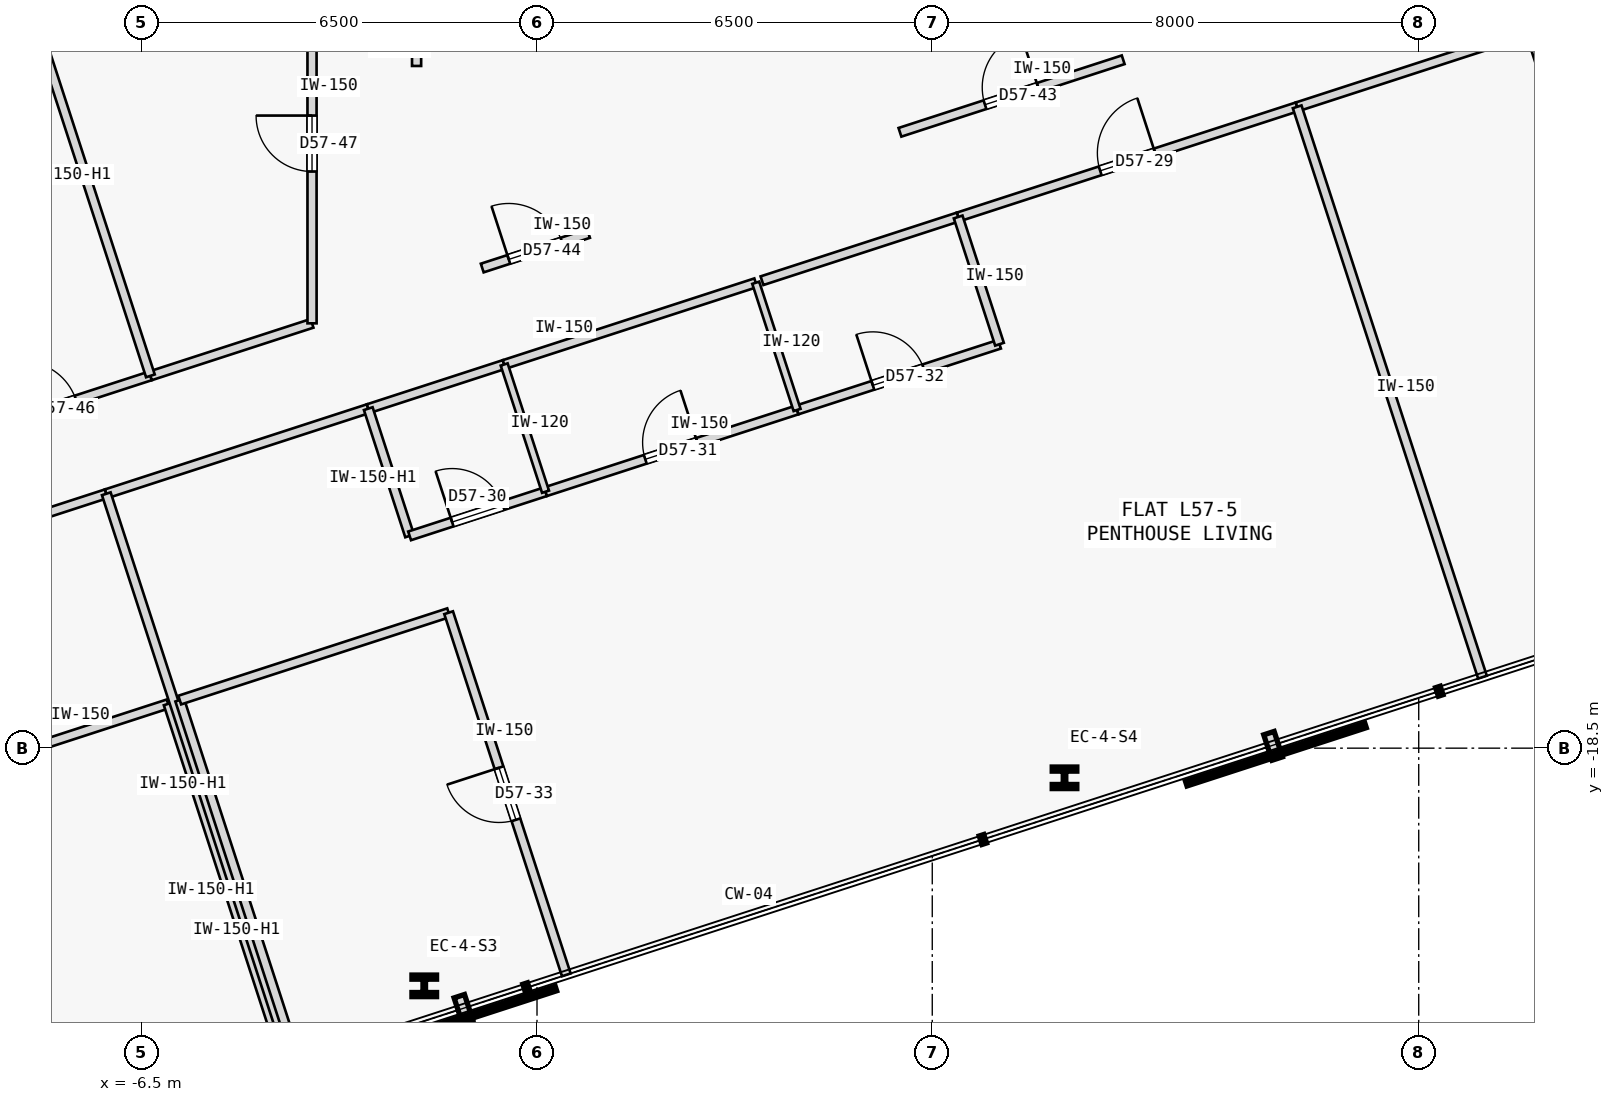
"""IFC4 building model, lengths in metres.
Left out: names, types, materials, properties, quantities, classifications, styles, units other than length and angle.
Written with IfcOpenShell. Run it as: python <this file> out.ifc"""

import sys

from ifc_helpers import new_model, si_unit, direction, frame, frame_2d, origin, origin_2d, place, context, subcontext, project, spatial, rectangle, i_section, extrude, element, fill, save


model = new_model("IFC4")
c1 = context("Model", 3, precision=1e-05, world=origin(), true_north=direction((0.0, 1.0)))
c2 = subcontext(c1, "Body", "Model", "MODEL_VIEW")
j1 = project(units=[si_unit("LENGTHUNIT", "METRE"), si_unit("PLANEANGLEUNIT", "RADIAN")], contexts=[c1])
p1 = place(None, origin())
s1 = spatial("IfcSite", under=j1, at=p1, CompositionType="ELEMENT")
p2 = place(p1, origin())
s2 = spatial("IfcBuilding", under=s1, at=p2, CompositionType="ELEMENT")
p3 = place(p2, frame((0.0, 0.0, 217.6)))
s3 = spatial("IfcBuildingStorey", under=s2, at=p3, CompositionType="ELEMENT", Elevation=217.6)
for number, where, z_axis, x_axis in (
    (1, (-1.854, -22.409, 0.0), (0.0, 0.0, 1.0), (1.0, 0.0, 0.0)),
    (2, (8.675, -18.988, 0.0), (0.0, 0.0, 1.0), (1.0, 0.0, 0.0)),
):
    element("IfcColumn", number, at=place(p3, frame(where, z_axis=z_axis, x_axis=x_axis)), inside=s3, PredefinedType="COLUMN", context=c2, shape_type="SweptSolid", body=[
        extrude(i_section(OverallWidth=0.405, OverallDepth=0.355, WebThickness=0.042, FlangeThickness=0.068, FilletRadius=0.015, at=origin_2d()), origin(), (0.0, 0.0, 1.0), 3.35),
    ])
p4 = place(p3, frame((-14.349, -16.677, 0.0), z_axis=(0.0, 0.0, 1.0), x_axis=(0.951058958043, 0.309009479345, 0.0)))
e3 = element("IfcWall", 3, at=p4, inside=s3, PredefinedType="PARTITIONING", context=c2, shape_type="SweptSolid", body=[
    extrude(rectangle(XDim=7.64, YDim=0.15, at=frame_2d((3.82, 0.0))), origin(), (0.0, 0.0, 1.0), 3.125),
])
p5 = place(p4, frame((3.345, 0.0, 0.0)))
e4 = element("IfcOpeningElement", 4, at=p5, cuts=e3, PredefinedType="OPENING", context=c2, shape_type="SweptSolid", body=[
    extrude(rectangle(XDim=0.95, YDim=2.15, at=frame_2d((0.475, 1.075))), frame((0.0, 0.085, 0.0), z_axis=(0.0, -1.0, 0.0), x_axis=(1.0, 0.0, 0.0)), (0.0, 0.0, 1.0), 0.17),
])
p6 = place(p3, frame((-7.083, -14.316, 0.0), z_axis=(0.0, 0.0, 1.0), x_axis=(0.951054265246, 0.309023922305, 0.0)))
e5 = element("IfcWall", 5, at=p6, inside=s3, PredefinedType="PARTITIONING", context=c2, shape_type="SweptSolid", body=[
    extrude(rectangle(XDim=4.53, YDim=0.15, at=frame_2d((2.265, 0.0))), origin(), (0.0, 0.0, 1.0), 3.125),
])
p7 = place(p3, frame((6.926, -9.765, 0.0), z_axis=(0.0, 0.0, 1.0), x_axis=(0.951054878391, 0.30902203528, 0.0)))
e6 = element("IfcWall", 6, at=p7, inside=s3, PredefinedType="PARTITIONING", context=c2, shape_type="SweptSolid", body=[
    extrude(rectangle(XDim=5.862, YDim=0.15, at=frame_2d((2.931, 0.0))), origin(), (0.0, 0.0, 1.0), 3.125),
])
p8 = place(p7, frame((2.456, 0.0, 0.0)))
e7 = element("IfcOpeningElement", 7, at=p8, cuts=e6, PredefinedType="OPENING", context=c2, shape_type="SweptSolid", body=[
    extrude(rectangle(XDim=0.95, YDim=2.15, at=frame_2d((0.475, 1.075))), frame((0.0, 0.085, 0.0), z_axis=(0.0, -1.0, 0.0), x_axis=(1.0, 0.0, 0.0)), (0.0, 0.0, 1.0), 0.17),
])
p9 = place(p3, frame((-2.775, -12.917, 0.0), z_axis=(0.0, 0.0, 1.0), x_axis=(0.951066131077, 0.308987401554, 0.0)))
e8 = element("IfcWall", 8, at=p9, inside=s3, PredefinedType="PARTITIONING", context=c2, shape_type="SweptSolid", body=[
    extrude(rectangle(XDim=2.35, YDim=0.15, at=frame_2d((1.175, 0.0))), origin(), (0.0, 0.0, 1.0), 3.125),
])
p10 = place(p3, frame((-0.54, -12.19, 0.0), z_axis=(0.0, 0.0, 1.0), x_axis=(0.951057987102, 0.309012467661, 0.0)))
e9 = element("IfcWall", 9, at=p10, inside=s3, PredefinedType="PARTITIONING", context=c2, shape_type="SweptSolid", body=[
    extrude(rectangle(XDim=4.35, YDim=0.15, at=frame_2d((2.175, 0.0))), origin(), (0.0, 0.0, 1.0), 3.125),
])
p11 = place(p3, frame((3.7, -10.813, 0.0), z_axis=(0.0, 0.0, 1.0), x_axis=(0.95106685659, 0.308985168408, 0.0)))
e10 = element("IfcWall", 10, at=p11, inside=s3, PredefinedType="PARTITIONING", context=c2, shape_type="SweptSolid", body=[
    extrude(rectangle(XDim=3.392, YDim=0.15, at=frame_2d((1.696, 0.0))), origin(), (0.0, 0.0, 1.0), 3.125),
])
p12 = place(p3, frame((12.501, -7.953, 0.0), z_axis=(0.0, 0.0, 1.0), x_axis=(0.951046103464, 0.309049039936, 0.0)))
e11 = element("IfcWall", 11, at=p12, inside=s3, PredefinedType="PARTITIONING", context=c2, shape_type="SweptSolid", body=[
    extrude(rectangle(XDim=4.025, YDim=0.15, at=frame_2d((2.012, 0.0))), origin(), (0.0, 0.0, 1.0), 3.125),
])
p13 = place(p3, frame((5.969, -8.372, 0.0), z_axis=(0.0, 0.0, 1.0), x_axis=(0.951053123415, 0.309027436391, 0.0)))
e12 = element("IfcWall", 12, at=p13, inside=s3, PredefinedType="PARTITIONING", context=c2, shape_type="SweptSolid", body=[
    extrude(rectangle(XDim=3.86, YDim=0.15, at=frame_2d((1.93, 0.0))), origin(), (0.0, 0.0, 1.0), 3.125),
])
p14 = place(p13, frame((1.47, 0.0, 0.0)))
e13 = element("IfcOpeningElement", 13, at=p14, cuts=e12, PredefinedType="OPENING", context=c2, shape_type="SweptSolid", body=[
    extrude(rectangle(XDim=0.92, YDim=2.15, at=frame_2d((0.46, 1.075))), frame((0.0, 0.085, 0.0), z_axis=(0.0, -1.0, 0.0), x_axis=(1.0, 0.0, 0.0)), (0.0, 0.0, 1.0), 0.17),
])
p15 = place(p3, frame((-0.901, -10.604, 0.0), z_axis=(0.0, 0.0, 1.0), x_axis=(0.951085784807, 0.308926900637, 0.0)))
e14 = element("IfcWall", 14, at=p15, inside=s3, PredefinedType="PARTITIONING", context=c2, shape_type="SweptSolid", body=[
    extrude(rectangle(XDim=1.838, YDim=0.15, at=frame_2d((0.919, 0.0))), origin(), (0.0, 0.0, 1.0), 3.125),
])
p16 = place(p15, frame((0.459, 0.0, 0.0)))
e15 = element("IfcOpeningElement", 15, at=p16, cuts=e14, PredefinedType="OPENING", context=c2, shape_type="SweptSolid", body=[
    extrude(rectangle(XDim=0.92, YDim=2.15, at=frame_2d((0.46, 1.075))), frame((0.0, 0.085, 0.0), z_axis=(0.0, -1.0, 0.0), x_axis=(1.0, 0.0, 0.0)), (0.0, 0.0, 1.0), 0.17),
])
p17 = place(p3, frame((-1.98, -7.281, 0.0), z_axis=(0.0, 0.0, 1.0), x_axis=(0.000784313484, 0.999999692426, 0.0)))
e16 = element("IfcWall", 16, at=p17, inside=s3, PredefinedType="PARTITIONING", context=c2, shape_type="SweptSolid", body=[
    extrude(rectangle(XDim=0.623, YDim=0.15, at=frame_2d((0.311, 0.0))), origin(), (0.0, 0.0, 1.0), 3.125),
])
p18 = place(p3, frame((-9.679, -13.457, 0.0), z_axis=(0.0, 0.0, 1.0), x_axis=(0.951054104561, 0.309024416831, 0.0)))
e17 = element("IfcWall", 17, at=p18, inside=s3, PredefinedType="PARTITIONING", context=c2, shape_type="SweptSolid", body=[
    extrude(rectangle(XDim=3.492, YDim=0.15, at=frame_2d((1.746, 0.0))), origin(), (0.0, 0.0, 1.0), 3.125),
])
p19 = place(p18, frame((1.286, 0.0, 0.0)))
e18 = element("IfcOpeningElement", 18, at=p19, cuts=e17, PredefinedType="OPENING", context=c2, shape_type="SweptSolid", body=[
    extrude(rectangle(XDim=0.92, YDim=2.15, at=frame_2d((0.46, 1.075))), frame((0.0, 0.085, 0.0), z_axis=(0.0, -1.0, 0.0), x_axis=(1.0, 0.0, 0.0)), (0.0, 0.0, 1.0), 0.17),
])
p20 = place(p3, frame((-6.358, -12.377, 0.0), z_axis=(0.0, 0.0, 1.0), x_axis=(0.951049473261, 0.309038669765, 0.0)))
e19 = element("IfcWall", 19, at=p20, inside=s3, PredefinedType="PARTITIONING", context=c2, shape_type="SweptSolid", body=[
    extrude(rectangle(XDim=2.795, YDim=0.15, at=frame_2d((1.397, 0.0))), origin(), (0.0, 0.0, 1.0), 3.125),
])
p21 = place(p3, frame((-3.7, -11.514, 0.0), z_axis=(0.0, 0.0, 1.0), x_axis=(-8.2572974e-05, 0.999999996591, 0.0)))
e20 = element("IfcWall", 20, at=p21, inside=s3, PredefinedType="PARTITIONING", context=c2, shape_type="SweptSolid", body=[
    extrude(rectangle(XDim=5.913, YDim=0.15, at=frame_2d((2.957, 0.0))), origin(), (0.0, 0.0, 1.0), 3.125),
])
p22 = place(p21, frame((2.497, 0.0, 0.0)))
e21 = element("IfcOpeningElement", 21, at=p22, cuts=e20, PredefinedType="OPENING", context=c2, shape_type="SweptSolid", body=[
    extrude(rectangle(XDim=0.92, YDim=2.15, at=frame_2d((0.46, 1.075))), frame((0.0, 0.085, 0.0), z_axis=(0.0, -1.0, 0.0), x_axis=(1.0, 0.0, 0.0)), (0.0, 0.0, 1.0), 0.17),
])
p23 = place(p3, frame((-10.488, -19.208, 0.0), z_axis=(0.0, 0.0, 1.0), x_axis=(0.951050272606, 0.309036209813, 0.0)))
e22 = element("IfcWall", 22, at=p23, inside=s3, PredefinedType="PARTITIONING", context=c2, shape_type="SweptSolid", body=[
    extrude(rectangle(XDim=4.65, YDim=0.15, at=frame_2d((2.325, 0.0))), origin(), (0.0, 0.0, 1.0), 3.125),
])
p24 = place(p3, frame((-4.131, -23.727, 0.0), z_axis=(0.0, 0.0, 1.0), x_axis=(-0.309013782848, 0.951057559777, 0.0)))
e23 = element("IfcWall", 23, at=p24, inside=s3, PredefinedType="PARTITIONING", context=c2, shape_type="SweptSolid", body=[
    extrude(rectangle(XDim=6.262, YDim=0.15, at=frame_2d((3.131, 0.0))), origin(), (0.0, 0.0, 1.0), 2.675),
])
p25 = place(p3, frame((-4.036, -23.696, 0.0), z_axis=(0.0, 0.0, 1.0), x_axis=(-0.309022258842, 0.95105480575, 0.0)))
e24 = element("IfcWall", 24, at=p25, inside=s3, PredefinedType="PARTITIONING", context=c2, shape_type="SweptSolid", body=[
    extrude(rectangle(XDim=9.862, YDim=0.15, at=frame_2d((4.931, 0.0))), origin(), (0.0, 0.0, 1.0), 2.675),
])
p26 = place(p3, frame((-2.095, -15.009, 0.0), z_axis=(0.0, 0.0, 1.0), x_axis=(-0.308960600764, 0.951074837842, 0.0)))
e25 = element("IfcWall", 25, at=p26, inside=s3, PredefinedType="PARTITIONING", context=c2, shape_type="SweptSolid", body=[
    extrude(rectangle(XDim=2.2, YDim=0.15, at=frame_2d((1.1, 0.0))), origin(), (0.0, 0.0, 1.0), 2.675),
])
p27 = place(p3, frame((-2.095, -15.009, 0.0), z_axis=(0.0, 0.0, 1.0), x_axis=(0.951076048914, 0.308956872689, 0.0)))
e26 = element("IfcWall", 26, at=p27, inside=s3, PredefinedType="PARTITIONING", context=c2, shape_type="SweptSolid", body=[
    extrude(rectangle(XDim=2.35, YDim=0.15, at=frame_2d((1.175, 0.0))), origin(), (0.0, 0.0, 1.0), 3.125),
])
p28 = place(p27, frame((0.735, 0.0, 0.0)))
e27 = element("IfcOpeningElement", 27, at=p28, cuts=e26, PredefinedType="OPENING", context=c2, shape_type="SweptSolid", body=[
    extrude(rectangle(XDim=0.88, YDim=2.15, at=frame_2d((0.44, 1.075))), frame((0.0, 0.085, 0.0), z_axis=(0.0, -1.0, 0.0), x_axis=(1.0, 0.0, 0.0)), (0.0, 0.0, 1.0), 0.17),
])
p29 = place(p3, frame((0.14, -14.283, 0.0), z_axis=(0.0, 0.0, 1.0), x_axis=(0.951057987102, 0.309012467661, 0.0)))
e28 = element("IfcWall", 28, at=p29, inside=s3, PredefinedType="PARTITIONING", context=c2, shape_type="SweptSolid", body=[
    extrude(rectangle(XDim=4.35, YDim=0.15, at=frame_2d((2.175, 0.0))), origin(), (0.0, 0.0, 1.0), 3.125),
])
p30 = place(p29, frame((1.725, 0.0, 0.0)))
e29 = element("IfcOpeningElement", 29, at=p30, cuts=e28, PredefinedType="OPENING", context=c2, shape_type="SweptSolid", body=[
    extrude(rectangle(XDim=0.9, YDim=2.15, at=frame_2d((0.45, 1.075))), frame((0.0, 0.085, 0.0), z_axis=(0.0, -1.0, 0.0), x_axis=(1.0, 0.0, 0.0)), (0.0, 0.0, 1.0), 0.17),
])
p31 = place(p3, frame((4.277, -12.938, 0.0), z_axis=(0.0, 0.0, 1.0), x_axis=(0.951055596592, 0.309019824916, 0.0)))
e30 = element("IfcWall", 30, at=p31, inside=s3, PredefinedType="PARTITIONING", context=c2, shape_type="SweptSolid", body=[
    extrude(rectangle(XDim=3.5, YDim=0.15, at=frame_2d((1.75, 0.0))), origin(), (0.0, 0.0, 1.0), 3.125),
])
p32 = place(p31, frame((1.31, 0.0, 0.0)))
e31 = element("IfcOpeningElement", 31, at=p32, cuts=e30, PredefinedType="OPENING", context=c2, shape_type="SweptSolid", body=[
    extrude(rectangle(XDim=0.88, YDim=2.15, at=frame_2d((0.44, 1.075))), frame((0.0, 0.085, 0.0), z_axis=(0.0, -1.0, 0.0), x_axis=(1.0, 0.0, 0.0)), (0.0, 0.0, 1.0), 0.17),
])
p33 = place(p3, frame((7.606, -11.857, 0.0), z_axis=(0.0, 0.0, 1.0), x_axis=(-0.309060979314, 0.951042223598, 0.0)))
e32 = element("IfcWall", 32, at=p33, inside=s3, PredefinedType="PARTITIONING", context=c2, shape_type="SweptSolid", body=[
    extrude(rectangle(XDim=2.2, YDim=0.15, at=frame_2d((1.1, 0.0))), origin(), (0.0, 0.0, 1.0), 3.125),
])
p34 = place(p3, frame((-3.941, -23.665, 0.0), z_axis=(0.0, 0.0, 1.0), x_axis=(-0.309013782848, 0.951057559777, 0.0)))
e33 = element("IfcWall", 33, at=p34, inside=s3, PredefinedType="PARTITIONING", context=c2, shape_type="SweptSolid", body=[
    extrude(rectangle(XDim=6.262, YDim=0.15, at=frame_2d((3.131, 0.0))), origin(), (0.0, 0.0, 1.0), 2.675),
])
p35 = place(p3, frame((-5.876, -17.709, 0.0), z_axis=(0.0, 0.0, 1.0), x_axis=(0.951065702951, 0.308988719326, 0.0)))
e34 = element("IfcWall", 34, at=p35, inside=s3, PredefinedType="PARTITIONING", context=c2, shape_type="SweptSolid", body=[
    extrude(rectangle(XDim=4.65, YDim=0.15, at=frame_2d((2.325, 0.0))), origin(), (0.0, 0.0, 1.0), 3.125),
])
p36 = place(p3, frame((0.482, -22.228, 0.0), z_axis=(0.0, 0.0, 1.0), x_axis=(-0.30902524124, 0.951053836687, 0.0)))
e35 = element("IfcWall", 35, at=p36, inside=s3, PredefinedType="PARTITIONING", context=c2, shape_type="SweptSolid", body=[
    extrude(rectangle(XDim=6.262, YDim=0.15, at=frame_2d((3.131, 0.0))), origin(), (0.0, 0.0, 1.0), 3.125),
])
p37 = place(p36, frame((2.681, 0.0, 0.0)))
e36 = element("IfcOpeningElement", 36, at=p37, cuts=e35, PredefinedType="OPENING", context=c2, shape_type="SweptSolid", body=[
    extrude(rectangle(XDim=0.9, YDim=2.15, at=frame_2d((0.45, 1.075))), frame((0.0, 0.085, 0.0), z_axis=(0.0, -1.0, 0.0), x_axis=(1.0, 0.0, 0.0)), (0.0, 0.0, 1.0), 0.17),
])
p38 = place(p3, frame((15.548, -17.333, 0.0), z_axis=(0.0, 0.0, 1.0), x_axis=(-0.308999867152, 0.951062081097, 0.0)))
e37 = element("IfcWall", 37, at=p38, inside=s3, PredefinedType="PARTITIONING", context=c2, shape_type="SweptSolid", body=[
    extrude(rectangle(XDim=9.862, YDim=0.15, at=frame_2d((4.931, 0.0))), origin(), (0.0, 0.0, 1.0), 3.125),
])
for number, where, z_axis, x_axis in (
    (38, (0.14, -14.283, 0.0), (0.0, 0.0, 1.0), (-0.309, 0.951, 0.0)),
    (39, (4.277, -12.938, 0.0), (0.0, 0.0, 1.0), (-0.309, 0.951, 0.0)),
):
    element("IfcWall", number, at=place(p3, frame(where, z_axis=z_axis, x_axis=x_axis)), inside=s3, PredefinedType="PARTITIONING", context=c2, shape_type="SweptSolid", body=[
        extrude(rectangle(XDim=2.2, YDim=0.12, at=frame_2d((1.1, 0.0))), origin(), (0.0, 0.0, 1.0), 3.125),
    ])
p39 = place(p3, frame((17.009, -8.802, 0.0), z_axis=(0.0, 0.0, 1.0), x_axis=(-0.309028364152, 0.951052821956, 0.0)))
e40 = element("IfcWall", 40, at=p39, inside=s3, PredefinedType="PARTITIONING", context=c2, shape_type="SweptSolid", body=[
    extrude(rectangle(XDim=2.2, YDim=0.15, at=frame_2d((1.1, 0.0))), origin(), (0.0, 0.0, 1.0), 3.125),
])
p40 = place(p3, frame((-6.358, -12.377, 0.0), z_axis=(0.0, 0.0, 1.0), x_axis=(-0.309024097906, 0.951054208189, 0.0)))
e41 = element("IfcWall", 41, at=p40, inside=s3, PredefinedType="PARTITIONING", context=c2, shape_type="SweptSolid", body=[
    extrude(rectangle(XDim=7.126, YDim=0.15, at=frame_2d((3.563, 0.0))), origin(), (0.0, 0.0, 1.0), 2.675),
])
p41 = place(p8, origin())
e42 = element("IfcDoor", 42, at=p41, inside=s3, OperationType="SINGLE_SWING_RIGHT", PredefinedType="DOOR", context=c2, shape_type="SweptSolid", body=[
    extrude(rectangle(XDim=0.95, YDim=2.15, at=frame_2d((0.475, 1.075))), frame((0.0, 0.025, 0.0), z_axis=(0.0, -1.0, 0.0), x_axis=(1.0, 0.0, 0.0)), (0.0, 0.0, 1.0), 0.05),
])
fill(e7, e42)
p42 = place(p28, origin())
e43 = element("IfcDoor", 43, at=p42, inside=s3, OperationType="SINGLE_SWING_LEFT", PredefinedType="DOOR", context=c2, shape_type="SweptSolid", body=[
    extrude(rectangle(XDim=0.88, YDim=2.15, at=frame_2d((0.44, 1.075))), frame((0.0, 0.025, 0.0), z_axis=(0.0, -1.0, 0.0), x_axis=(1.0, 0.0, 0.0)), (0.0, 0.0, 1.0), 0.05),
])
fill(e27, e43)
p43 = place(p30, origin())
e44 = element("IfcDoor", 44, at=p43, inside=s3, OperationType="SINGLE_SWING_RIGHT", PredefinedType="DOOR", context=c2, shape_type="SweptSolid", body=[
    extrude(rectangle(XDim=0.9, YDim=2.15, at=frame_2d((0.45, 1.075))), frame((0.0, 0.025, 0.0), z_axis=(0.0, -1.0, 0.0), x_axis=(1.0, 0.0, 0.0)), (0.0, 0.0, 1.0), 0.05),
])
fill(e29, e44)
p44 = place(p32, origin())
e45 = element("IfcDoor", 45, at=p44, inside=s3, OperationType="SINGLE_SWING_LEFT", PredefinedType="DOOR", context=c2, shape_type="SweptSolid", body=[
    extrude(rectangle(XDim=0.88, YDim=2.15, at=frame_2d((0.44, 1.075))), frame((0.0, 0.025, 0.0), z_axis=(0.0, -1.0, 0.0), x_axis=(1.0, 0.0, 0.0)), (0.0, 0.0, 1.0), 0.05),
])
fill(e31, e45)
p45 = place(p37, origin())
e46 = element("IfcDoor", 46, at=p45, inside=s3, OperationType="SINGLE_SWING_RIGHT", PredefinedType="DOOR", context=c2, shape_type="SweptSolid", body=[
    extrude(rectangle(XDim=0.9, YDim=2.15, at=frame_2d((0.45, 1.075))), frame((0.0, 0.025, 0.0), z_axis=(0.0, -1.0, 0.0), x_axis=(1.0, 0.0, 0.0)), (0.0, 0.0, 1.0), 0.05),
])
fill(e36, e46)
p46 = place(p14, origin())
e47 = element("IfcDoor", 47, at=p46, inside=s3, OperationType="SINGLE_SWING_RIGHT", PredefinedType="DOOR", context=c2, shape_type="SweptSolid", body=[
    extrude(rectangle(XDim=0.92, YDim=2.15, at=frame_2d((0.46, 1.075))), frame((0.0, 0.025, 0.0), z_axis=(0.0, -1.0, 0.0), x_axis=(1.0, 0.0, 0.0)), (0.0, 0.0, 1.0), 0.05),
])
fill(e13, e47)
p47 = place(p16, origin())
e48 = element("IfcDoor", 48, at=p47, inside=s3, OperationType="SINGLE_SWING_LEFT", PredefinedType="DOOR", context=c2, shape_type="SweptSolid", body=[
    extrude(rectangle(XDim=0.92, YDim=2.15, at=frame_2d((0.46, 1.075))), frame((0.0, 0.025, 0.0), z_axis=(0.0, -1.0, 0.0), x_axis=(1.0, 0.0, 0.0)), (0.0, 0.0, 1.0), 0.05),
])
fill(e15, e48)
p48 = place(p19, origin())
e49 = element("IfcDoor", 49, at=p48, inside=s3, OperationType="SINGLE_SWING_LEFT", PredefinedType="DOOR", context=c2, shape_type="SweptSolid", body=[
    extrude(rectangle(XDim=0.92, YDim=2.15, at=frame_2d((0.46, 1.075))), frame((0.0, 0.025, 0.0), z_axis=(0.0, -1.0, 0.0), x_axis=(1.0, 0.0, 0.0)), (0.0, 0.0, 1.0), 0.05),
])
fill(e18, e49)
p49 = place(p22, origin())
e50 = element("IfcDoor", 50, at=p49, inside=s3, OperationType="SINGLE_SWING_RIGHT", PredefinedType="DOOR", context=c2, shape_type="SweptSolid", body=[
    extrude(rectangle(XDim=0.92, YDim=2.15, at=frame_2d((0.46, 1.075))), frame((0.0, 0.025, 0.0), z_axis=(0.0, -1.0, 0.0), x_axis=(1.0, 0.0, 0.0)), (0.0, 0.0, 1.0), 0.05),
])
fill(e21, e50)
save(model, sys.argv[1])
